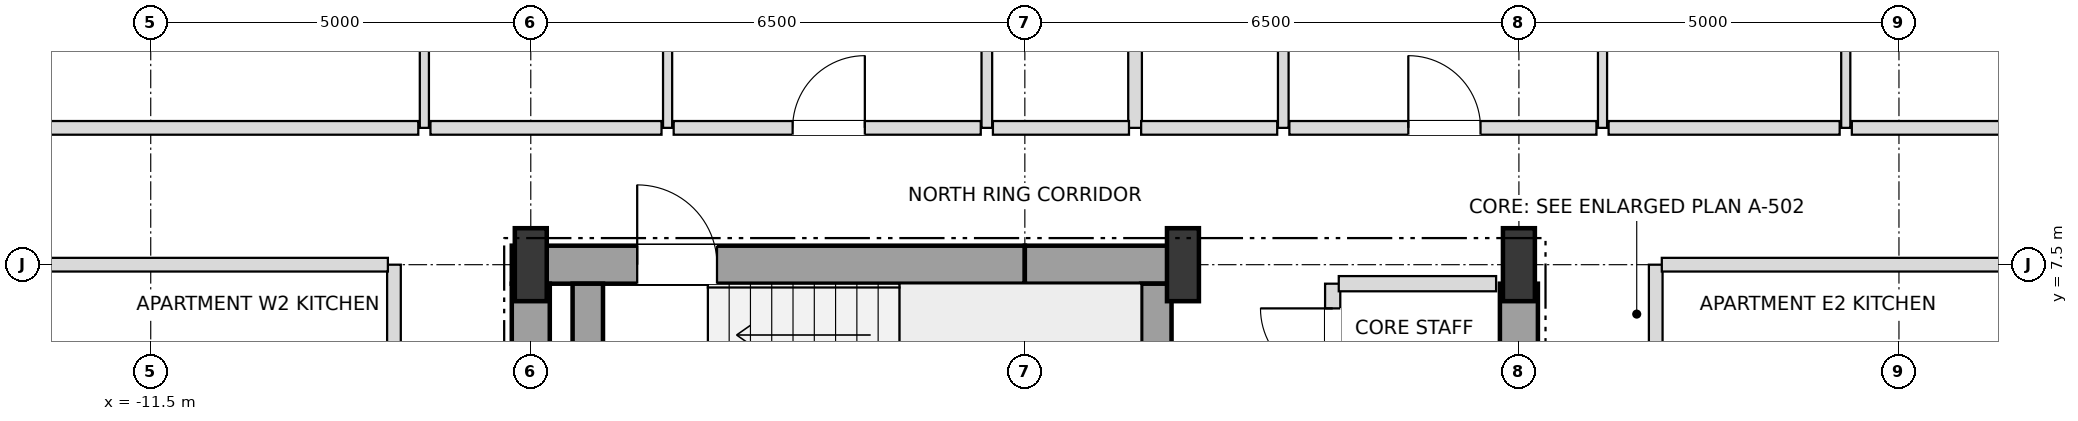
"""IFC4 building model, lengths in metres.
Left out: names, types, materials, properties, quantities, classifications, styles, units other than length and angle.
Written with IfcOpenShell. Run it as: python <this file> out.ifc"""

import sys

from ifc_helpers import new_model, si_unit, direction, frame, frame_2d, origin, origin_2d, place, context, subcontext, project, spatial, rectangle, i_section, extrude, element, fill, save


model = new_model("IFC4")
c1 = context("Model", 3, precision=1e-05, world=origin(), true_north=direction((0.0, 1.0)))
c2 = subcontext(c1, "Body", "Model", "MODEL_VIEW")
j1 = project(units=[si_unit("LENGTHUNIT", "METRE"), si_unit("PLANEANGLEUNIT", "RADIAN")], contexts=[c1])
p1 = place(None, origin())
s1 = spatial("IfcSite", under=j1, at=p1, CompositionType="ELEMENT")
p2 = place(p1, origin())
s2 = spatial("IfcBuilding", under=s1, at=p2, CompositionType="ELEMENT")
p3 = place(p2, frame((0.0, 0.0, 32.4)))
s3 = spatial("IfcBuildingStorey", under=s2, at=p3, CompositionType="ELEMENT", Elevation=32.4)
for number, where, z_axis, x_axis in (
    (1, (-6.5, 7.5, 0.0), (0.0, 0.0, 1.0), (1.0, 0.0, 0.0)),
    (2, (2.08, 7.5, 0.0), (0.0, 0.0, 1.0), (1.0, 0.0, 0.0)),
    (3, (6.5, 7.5, 0.0), (0.0, 0.0, 1.0), (1.0, 0.0, 0.0)),
):
    element("IfcColumn", number, at=place(p3, frame(where, z_axis=z_axis, x_axis=x_axis)), inside=s3, PredefinedType="COLUMN", context=c2, shape_type="SweptSolid", body=[
        extrude(i_section(OverallWidth=0.42, OverallDepth=0.96, WebThickness=0.022, FlangeThickness=0.034, at=origin_2d()), origin(), (0.0, 0.0, 1.0), 3.6),
    ])
p4 = place(p3, frame((-6.75, 7.5, 0.0), z_axis=(0.0, 0.0, 1.0), x_axis=(1.0, 0.0, 0.0)))
e4 = element("IfcWall", 4, at=p4, inside=s3, PredefinedType="SHEAR", context=c2, shape_type="SweptSolid", body=[
    extrude(rectangle(XDim=6.75, YDim=0.5, at=frame_2d((3.375, 0.0))), origin(), (0.0, 0.0, 1.0), 3.38),
])
p5 = place(p4, frame((1.65, 0.0, 0.0)))
e5 = element("IfcOpeningElement", 5, at=p5, cuts=e4, PredefinedType="OPENING", context=c2, shape_type="SweptSolid", body=[
    extrude(rectangle(XDim=1.05, YDim=2.15, at=frame_2d((0.525, 1.075))), frame((0.0, 0.26, 0.0), z_axis=(0.0, -1.0, 0.0), x_axis=(1.0, 0.0, 0.0)), (0.0, 0.0, 1.0), 0.52),
])
p6 = place(p3, frame((0.0, 7.5, 0.0), z_axis=(0.0, 0.0, 1.0), x_axis=(1.0, 0.0, 0.0)))
e6 = element("IfcWall", 6, at=p6, inside=s3, PredefinedType="SHEAR", context=c2, shape_type="SweptSolid", body=[
    extrude(rectangle(XDim=2.08, YDim=0.5, at=frame_2d((1.04, 0.0))), origin(), (0.0, 0.0, 1.0), 3.38),
])
for number, where, z_axis, x_axis in (
    (7, (-6.5, 3.95, 0.0), (0.0, 0.0, 1.0), (0.0, 1.0, 0.0)),
    (8, (6.5, 3.95, 0.0), (0.0, 0.0, 1.0), (0.0, 1.0, 0.0)),
):
    element("IfcWall", number, at=place(p3, frame(where, z_axis=z_axis, x_axis=x_axis)), inside=s3, PredefinedType="SHEAR", context=c2, shape_type="SweptSolid", body=[
        extrude(rectangle(XDim=3.3, YDim=0.5, at=frame_2d((1.65, 0.0))), origin(), (0.0, 0.0, 1.0), 3.38),
    ])
for number, where, z_axis, x_axis in (
    (9, (1.73, 3.95, 0.0), (0.0, 0.0, 1.0), (0.0, 1.0, 0.0)),
    (10, (-5.75, 3.95, 0.0), (0.0, 0.0, 1.0), (0.0, 1.0, 0.0)),
):
    element("IfcWall", number, at=place(p3, frame(where, z_axis=z_axis, x_axis=x_axis)), inside=s3, PredefinedType="SHEAR", context=c2, shape_type="SweptSolid", body=[
        extrude(rectangle(XDim=3.3, YDim=0.4, at=frame_2d((1.65, 0.0))), origin(), (0.0, 0.0, 1.0), 3.38),
    ])
p7 = place(p3, frame((-8.3, -7.5, 0.0), z_axis=(0.0, 0.0, 1.0), x_axis=(0.0, 1.0, 0.0)))
e11 = element("IfcWall", 11, at=p7, inside=s3, PredefinedType="PARTITIONING", context=c2, shape_type="SweptSolid", body=[
    extrude(rectangle(XDim=15.0, YDim=0.18, at=frame_2d((7.5, 0.0))), origin(), (0.0, 0.0, 1.0), 3.38),
])
p8 = place(p7, frame((2.965, 0.0, 0.0)))
e12 = element("IfcOpeningElement", 12, at=p8, cuts=e11, PredefinedType="OPENING", context=c2, shape_type="SweptSolid", body=[
    extrude(rectangle(XDim=0.95, YDim=2.15, at=frame_2d((0.475, 1.075))), frame((0.0, 0.1, 0.0), z_axis=(0.0, -1.0, 0.0), x_axis=(1.0, 0.0, 0.0)), (0.0, 0.0, 1.0), 0.2),
])
p9 = place(p7, frame((10.465, 0.0, 0.0)))
e13 = element("IfcOpeningElement", 13, at=p9, cuts=e11, PredefinedType="OPENING", context=c2, shape_type="SweptSolid", body=[
    extrude(rectangle(XDim=0.95, YDim=2.15, at=frame_2d((0.475, 1.075))), frame((0.0, 0.1, 0.0), z_axis=(0.0, -1.0, 0.0), x_axis=(1.0, 0.0, 0.0)), (0.0, 0.0, 1.0), 0.2),
])
p10 = place(p3, frame((-7.9, 9.3, 0.0), z_axis=(0.0, 0.0, 1.0), x_axis=(0.0, 1.0, 0.0)))
e14 = element("IfcWall", 14, at=p10, inside=s3, PredefinedType="PARTITIONING", context=c2, shape_type="SweptSolid", body=[
    extrude(rectangle(XDim=9.6, YDim=0.12, at=frame_2d((4.8, 0.0))), origin(), (0.0, 0.0, 1.0), 2.816),
])
p11 = place(p10, frame((4.35, 0.0, 0.0)))
e15 = element("IfcOpeningElement", 15, at=p11, cuts=e14, PredefinedType="OPENING", context=c2, shape_type="SweptSolid", body=[
    extrude(rectangle(XDim=0.9, YDim=2.1, at=frame_2d((0.45, 1.05))), frame((0.0, 0.07, 0.0), z_axis=(0.0, -1.0, 0.0), x_axis=(1.0, 0.0, 0.0)), (0.0, 0.0, 1.0), 0.14),
])
p12 = place(p3, frame((-4.7, 9.3, 0.0), z_axis=(0.0, 0.0, 1.0), x_axis=(0.0, 1.0, 0.0)))
e16 = element("IfcWall", 16, at=p12, inside=s3, PredefinedType="PARTITIONING", context=c2, shape_type="SweptSolid", body=[
    extrude(rectangle(XDim=9.6, YDim=0.12, at=frame_2d((4.8, 0.0))), origin(), (0.0, 0.0, 1.0), 2.948),
])
p13 = place(p12, frame((4.325, 0.0, 0.0)))
e17 = element("IfcOpeningElement", 17, at=p13, cuts=e16, PredefinedType="OPENING", context=c2, shape_type="SweptSolid", body=[
    extrude(rectangle(XDim=0.95, YDim=2.1, at=frame_2d((0.475, 1.05))), frame((0.0, 0.07, 0.0), z_axis=(0.0, -1.0, 0.0), x_axis=(1.0, 0.0, 0.0)), (0.0, 0.0, 1.0), 0.14),
])
p14 = place(p3, frame((-0.5, 9.3, 0.0), z_axis=(0.0, 0.0, 1.0), x_axis=(0.0, 1.0, 0.0)))
e18 = element("IfcWall", 18, at=p14, inside=s3, PredefinedType="PARTITIONING", context=c2, shape_type="SweptSolid", body=[
    extrude(rectangle(XDim=9.6, YDim=0.14, at=frame_2d((4.8, 0.0))), origin(), (0.0, 0.0, 1.0), 2.948),
])
p15 = place(p14, frame((4.35, 0.0, 0.0)))
e19 = element("IfcOpeningElement", 19, at=p15, cuts=e18, PredefinedType="OPENING", context=c2, shape_type="SweptSolid", body=[
    extrude(rectangle(XDim=0.9, YDim=2.1, at=frame_2d((0.45, 1.05))), frame((0.0, 0.08, 0.0), z_axis=(0.0, -1.0, 0.0), x_axis=(1.0, 0.0, 0.0)), (0.0, 0.0, 1.0), 0.16),
])
p16 = place(p3, frame((1.45, 9.3, 0.0), z_axis=(0.0, 0.0, 1.0), x_axis=(0.0, 1.0, 0.0)))
e20 = element("IfcWall", 20, at=p16, inside=s3, PredefinedType="PARTITIONING", context=c2, shape_type="SweptSolid", body=[
    extrude(rectangle(XDim=15.6, YDim=0.18, at=frame_2d((7.8, 0.0))), origin(), (0.0, 0.0, 1.0), 2.816),
])
p17 = place(p3, frame((3.4, 9.3, 0.0), z_axis=(0.0, 0.0, 1.0), x_axis=(0.0, 1.0, 0.0)))
e21 = element("IfcWall", 21, at=p17, inside=s3, PredefinedType="PARTITIONING", context=c2, shape_type="SweptSolid", body=[
    extrude(rectangle(XDim=9.6, YDim=0.14, at=frame_2d((4.8, 0.0))), origin(), (0.0, 0.0, 1.0), 2.948),
])
p18 = place(p17, frame((4.35, 0.0, 0.0)))
e22 = element("IfcOpeningElement", 22, at=p18, cuts=e21, PredefinedType="OPENING", context=c2, shape_type="SweptSolid", body=[
    extrude(rectangle(XDim=0.9, YDim=2.1, at=frame_2d((0.45, 1.05))), frame((0.0, 0.08, 0.0), z_axis=(0.0, -1.0, 0.0), x_axis=(1.0, 0.0, 0.0)), (0.0, 0.0, 1.0), 0.16),
])
p19 = place(p3, frame((4.05, 4.2, 0.0), z_axis=(0.0, 0.0, 1.0), x_axis=(0.0, 1.0, 0.0)))
e23 = element("IfcWall", 23, at=p19, inside=s3, PredefinedType="SOLIDWALL", context=c2, shape_type="SweptSolid", body=[
    extrude(rectangle(XDim=3.05, YDim=0.2, at=frame_2d((1.525, 0.0))), origin(), (0.0, 0.0, 1.0), 3.38),
])
p20 = place(p19, frame((0.275, 0.0, 0.0)))
e24 = element("IfcOpeningElement", 24, at=p20, cuts=e23, PredefinedType="OPENING", context=c2, shape_type="SweptSolid", body=[
    extrude(rectangle(XDim=0.95, YDim=2.15, at=frame_2d((0.475, 1.075))), frame((0.0, 0.11, 0.0), z_axis=(0.0, -1.0, 0.0), x_axis=(1.0, 0.0, 0.0)), (0.0, 0.0, 1.0), 0.22),
])
p21 = place(p19, frame((1.775, 0.0, 0.0)))
e25 = element("IfcOpeningElement", 25, at=p21, cuts=e23, PredefinedType="OPENING", context=c2, shape_type="SweptSolid", body=[
    extrude(rectangle(XDim=0.95, YDim=2.15, at=frame_2d((0.475, 1.075))), frame((0.0, 0.11, 0.0), z_axis=(0.0, -1.0, 0.0), x_axis=(1.0, 0.0, 0.0)), (0.0, 0.0, 1.0), 0.22),
])
p22 = place(p3, frame((7.6, 9.3, 0.0), z_axis=(0.0, 0.0, 1.0), x_axis=(0.0, 1.0, 0.0)))
e26 = element("IfcWall", 26, at=p22, inside=s3, PredefinedType="PARTITIONING", context=c2, shape_type="SweptSolid", body=[
    extrude(rectangle(XDim=15.6, YDim=0.12, at=frame_2d((7.8, 0.0))), origin(), (0.0, 0.0, 1.0), 2.816),
])
p23 = place(p22, frame((4.325, 0.0, 0.0)))
e27 = element("IfcOpeningElement", 27, at=p23, cuts=e26, PredefinedType="OPENING", context=c2, shape_type="SweptSolid", body=[
    extrude(rectangle(XDim=0.95, YDim=2.1, at=frame_2d((0.475, 1.05))), frame((0.0, 0.07, 0.0), z_axis=(0.0, -1.0, 0.0), x_axis=(1.0, 0.0, 0.0)), (0.0, 0.0, 1.0), 0.14),
])
p24 = place(p22, frame((12.15, 0.0, 0.0)))
e28 = element("IfcOpeningElement", 28, at=p24, cuts=e26, PredefinedType="OPENING", context=c2, shape_type="SweptSolid", body=[
    extrude(rectangle(XDim=0.9, YDim=2.1, at=frame_2d((0.45, 1.05))), frame((0.0, 0.07, 0.0), z_axis=(0.0, -1.0, 0.0), x_axis=(1.0, 0.0, 0.0)), (0.0, 0.0, 1.0), 0.14),
])
p25 = place(p3, frame((8.3, -7.5, 0.0), z_axis=(0.0, 0.0, 1.0), x_axis=(0.0, 1.0, 0.0)))
e29 = element("IfcWall", 29, at=p25, inside=s3, PredefinedType="PARTITIONING", context=c2, shape_type="SweptSolid", body=[
    extrude(rectangle(XDim=15.0, YDim=0.18, at=frame_2d((7.5, 0.0))), origin(), (0.0, 0.0, 1.0), 3.38),
])
p26 = place(p25, frame((2.995, 0.0, 0.0)))
e30 = element("IfcOpeningElement", 30, at=p26, cuts=e29, PredefinedType="OPENING", context=c2, shape_type="SweptSolid", body=[
    extrude(rectangle(XDim=0.95, YDim=2.15, at=frame_2d((0.475, 1.075))), frame((0.0, 0.1, 0.0), z_axis=(0.0, -1.0, 0.0), x_axis=(1.0, 0.0, 0.0)), (0.0, 0.0, 1.0), 0.2),
])
p27 = place(p25, frame((10.495, 0.0, 0.0)))
e31 = element("IfcOpeningElement", 31, at=p27, cuts=e29, PredefinedType="OPENING", context=c2, shape_type="SweptSolid", body=[
    extrude(rectangle(XDim=0.95, YDim=2.15, at=frame_2d((0.475, 1.075))), frame((0.0, 0.1, 0.0), z_axis=(0.0, -1.0, 0.0), x_axis=(1.0, 0.0, 0.0)), (0.0, 0.0, 1.0), 0.2),
])
p28 = place(p3, frame((10.8, 9.3, 0.0), z_axis=(0.0, 0.0, 1.0), x_axis=(0.0, 1.0, 0.0)))
e32 = element("IfcWall", 32, at=p28, inside=s3, PredefinedType="PARTITIONING", context=c2, shape_type="SweptSolid", body=[
    extrude(rectangle(XDim=9.6, YDim=0.12, at=frame_2d((4.8, 0.0))), origin(), (0.0, 0.0, 1.0), 2.816),
])
p29 = place(p28, frame((4.325, 0.0, 0.0)))
e33 = element("IfcOpeningElement", 33, at=p29, cuts=e32, PredefinedType="OPENING", context=c2, shape_type="SweptSolid", body=[
    extrude(rectangle(XDim=0.95, YDim=2.1, at=frame_2d((0.475, 1.05))), frame((0.0, 0.07, 0.0), z_axis=(0.0, -1.0, 0.0), x_axis=(1.0, 0.0, 0.0)), (0.0, 0.0, 1.0), 0.14),
])
p30 = place(p3, frame((4.13, 7.25, 0.0), z_axis=(0.0, 0.0, 1.0), x_axis=(1.0, 0.0, 0.0)))
e34 = element("IfcWall", 34, at=p30, inside=s3, PredefinedType="SOLIDWALL", context=c2, shape_type="SweptSolid", body=[
    extrude(rectangle(XDim=2.07, YDim=0.2, at=frame_2d((1.035, 0.0))), origin(), (0.0, 0.0, 1.0), 3.38),
])
for number, where, z_axis, x_axis in (
    (35, (-16.02, 7.5, 0.0), (0.0, 0.0, 1.0), (1.0, 0.0, 0.0)),
    (36, (8.38, 7.5, 0.0), (0.0, 0.0, 1.0), (1.0, 0.0, 0.0)),
):
    element("IfcWall", number, at=place(p3, frame(where, z_axis=z_axis, x_axis=x_axis)), inside=s3, PredefinedType="PARTITIONING", context=c2, shape_type="SweptSolid", body=[
        extrude(rectangle(XDim=7.64, YDim=0.18, at=frame_2d((3.82, 0.0))), origin(), (0.0, 0.0, 1.0), 2.816),
    ])
p31 = place(p3, frame((-18.32, 9.3, 0.0), z_axis=(0.0, 0.0, 1.0), x_axis=(1.0, 0.0, 0.0)))
e37 = element("IfcWall", 37, at=p31, inside=s3, PredefinedType="PARTITIONING", context=c2, shape_type="SweptSolid", body=[
    extrude(rectangle(XDim=10.34, YDim=0.18, at=frame_2d((5.17, 0.0))), origin(), (0.0, 0.0, 1.0), 2.816),
])
p32 = place(p3, frame((-7.82, 9.3, 0.0), z_axis=(0.0, 0.0, 1.0), x_axis=(1.0, 0.0, 0.0)))
e38 = element("IfcWall", 38, at=p32, inside=s3, PredefinedType="PARTITIONING", context=c2, shape_type="SweptSolid", body=[
    extrude(rectangle(XDim=3.04, YDim=0.18, at=frame_2d((1.52, 0.0))), origin(), (0.0, 0.0, 1.0), 2.816),
])
p33 = place(p3, frame((-4.62, 9.3, 0.0), z_axis=(0.0, 0.0, 1.0), x_axis=(1.0, 0.0, 0.0)))
e39 = element("IfcWall", 39, at=p33, inside=s3, PredefinedType="PARTITIONING", context=c2, shape_type="SweptSolid", body=[
    extrude(rectangle(XDim=4.04, YDim=0.18, at=frame_2d((2.02, 0.0))), origin(), (0.0, 0.0, 1.0), 3.38),
])
p34 = place(p33, frame((1.565, 0.0, 0.0)))
e40 = element("IfcOpeningElement", 40, at=p34, cuts=e39, PredefinedType="OPENING", context=c2, shape_type="SweptSolid", body=[
    extrude(rectangle(XDim=0.95, YDim=2.15, at=frame_2d((0.475, 1.075))), frame((0.0, 0.1, 0.0), z_axis=(0.0, -1.0, 0.0), x_axis=(1.0, 0.0, 0.0)), (0.0, 0.0, 1.0), 0.2),
])
for number, where, z_axis, x_axis in (
    (41, (-0.42, 9.3, 0.0), (0.0, 0.0, 1.0), (1.0, 0.0, 0.0)),
    (42, (1.53, 9.3, 0.0), (0.0, 0.0, 1.0), (1.0, 0.0, 0.0)),
):
    element("IfcWall", number, at=place(p3, frame(where, z_axis=z_axis, x_axis=x_axis)), inside=s3, PredefinedType="PARTITIONING", context=c2, shape_type="SweptSolid", body=[
        extrude(rectangle(XDim=1.79, YDim=0.18, at=frame_2d((0.895, 0.0))), origin(), (0.0, 0.0, 1.0), 3.38),
    ])
p35 = place(p3, frame((3.48, 9.3, 0.0), z_axis=(0.0, 0.0, 1.0), x_axis=(1.0, 0.0, 0.0)))
e43 = element("IfcWall", 43, at=p35, inside=s3, PredefinedType="PARTITIONING", context=c2, shape_type="SweptSolid", body=[
    extrude(rectangle(XDim=4.04, YDim=0.18, at=frame_2d((2.02, 0.0))), origin(), (0.0, 0.0, 1.0), 2.816),
])
p36 = place(p35, frame((1.565, 0.0, 0.0)))
e44 = element("IfcOpeningElement", 44, at=p36, cuts=e43, PredefinedType="OPENING", context=c2, shape_type="SweptSolid", body=[
    extrude(rectangle(XDim=0.95, YDim=2.15, at=frame_2d((0.475, 1.075))), frame((0.0, 0.1, 0.0), z_axis=(0.0, -1.0, 0.0), x_axis=(1.0, 0.0, 0.0)), (0.0, 0.0, 1.0), 0.2),
])
p37 = place(p3, frame((7.68, 9.3, 0.0), z_axis=(0.0, 0.0, 1.0), x_axis=(1.0, 0.0, 0.0)))
e45 = element("IfcWall", 45, at=p37, inside=s3, PredefinedType="PARTITIONING", context=c2, shape_type="SweptSolid", body=[
    extrude(rectangle(XDim=3.04, YDim=0.18, at=frame_2d((1.52, 0.0))), origin(), (0.0, 0.0, 1.0), 3.38),
])
p38 = place(p3, frame((10.88, 9.3, 0.0), z_axis=(0.0, 0.0, 1.0), x_axis=(1.0, 0.0, 0.0)))
e46 = element("IfcWall", 46, at=p38, inside=s3, PredefinedType="PARTITIONING", context=c2, shape_type="SweptSolid", body=[
    extrude(rectangle(XDim=7.44, YDim=0.18, at=frame_2d((3.72, 0.0))), origin(), (0.0, 0.0, 1.0), 2.816),
])
p39 = place(p5, origin())
e47 = element("IfcDoor", 47, at=p39, inside=s3, OperationType="SINGLE_SWING_LEFT", PredefinedType="DOOR", context=c2, shape_type="SweptSolid", body=[
    extrude(rectangle(XDim=1.05, YDim=2.15, at=frame_2d((0.525, 1.075))), frame((0.0, 0.025, 0.0), z_axis=(0.0, -1.0, 0.0), x_axis=(1.0, 0.0, 0.0)), (0.0, 0.0, 1.0), 0.05),
])
fill(e5, e47)
p40 = place(p21, origin())
e48 = element("IfcDoor", 48, at=p40, inside=s3, OperationType="SINGLE_SWING_RIGHT", PredefinedType="DOOR", context=c2, shape_type="SweptSolid", body=[
    extrude(rectangle(XDim=0.95, YDim=2.15, at=frame_2d((0.475, 1.075))), frame((0.0, 0.025, 0.0), z_axis=(0.0, -1.0, 0.0), x_axis=(1.0, 0.0, 0.0)), (0.0, 0.0, 1.0), 0.05),
])
fill(e25, e48)
p41 = place(p34, origin())
e49 = element("IfcDoor", 49, at=p41, inside=s3, OperationType="SINGLE_SWING_RIGHT", PredefinedType="DOOR", context=c2, shape_type="SweptSolid", body=[
    extrude(rectangle(XDim=0.95, YDim=2.15, at=frame_2d((0.475, 1.075))), frame((0.0, 0.025, 0.0), z_axis=(0.0, -1.0, 0.0), x_axis=(1.0, 0.0, 0.0)), (0.0, 0.0, 1.0), 0.05),
])
fill(e40, e49)
p42 = place(p36, origin())
e50 = element("IfcDoor", 50, at=p42, inside=s3, OperationType="SINGLE_SWING_LEFT", PredefinedType="DOOR", context=c2, shape_type="SweptSolid", body=[
    extrude(rectangle(XDim=0.95, YDim=2.15, at=frame_2d((0.475, 1.075))), frame((0.0, 0.025, 0.0), z_axis=(0.0, -1.0, 0.0), x_axis=(1.0, 0.0, 0.0)), (0.0, 0.0, 1.0), 0.05),
])
fill(e44, e50)
save(model, sys.argv[1])
